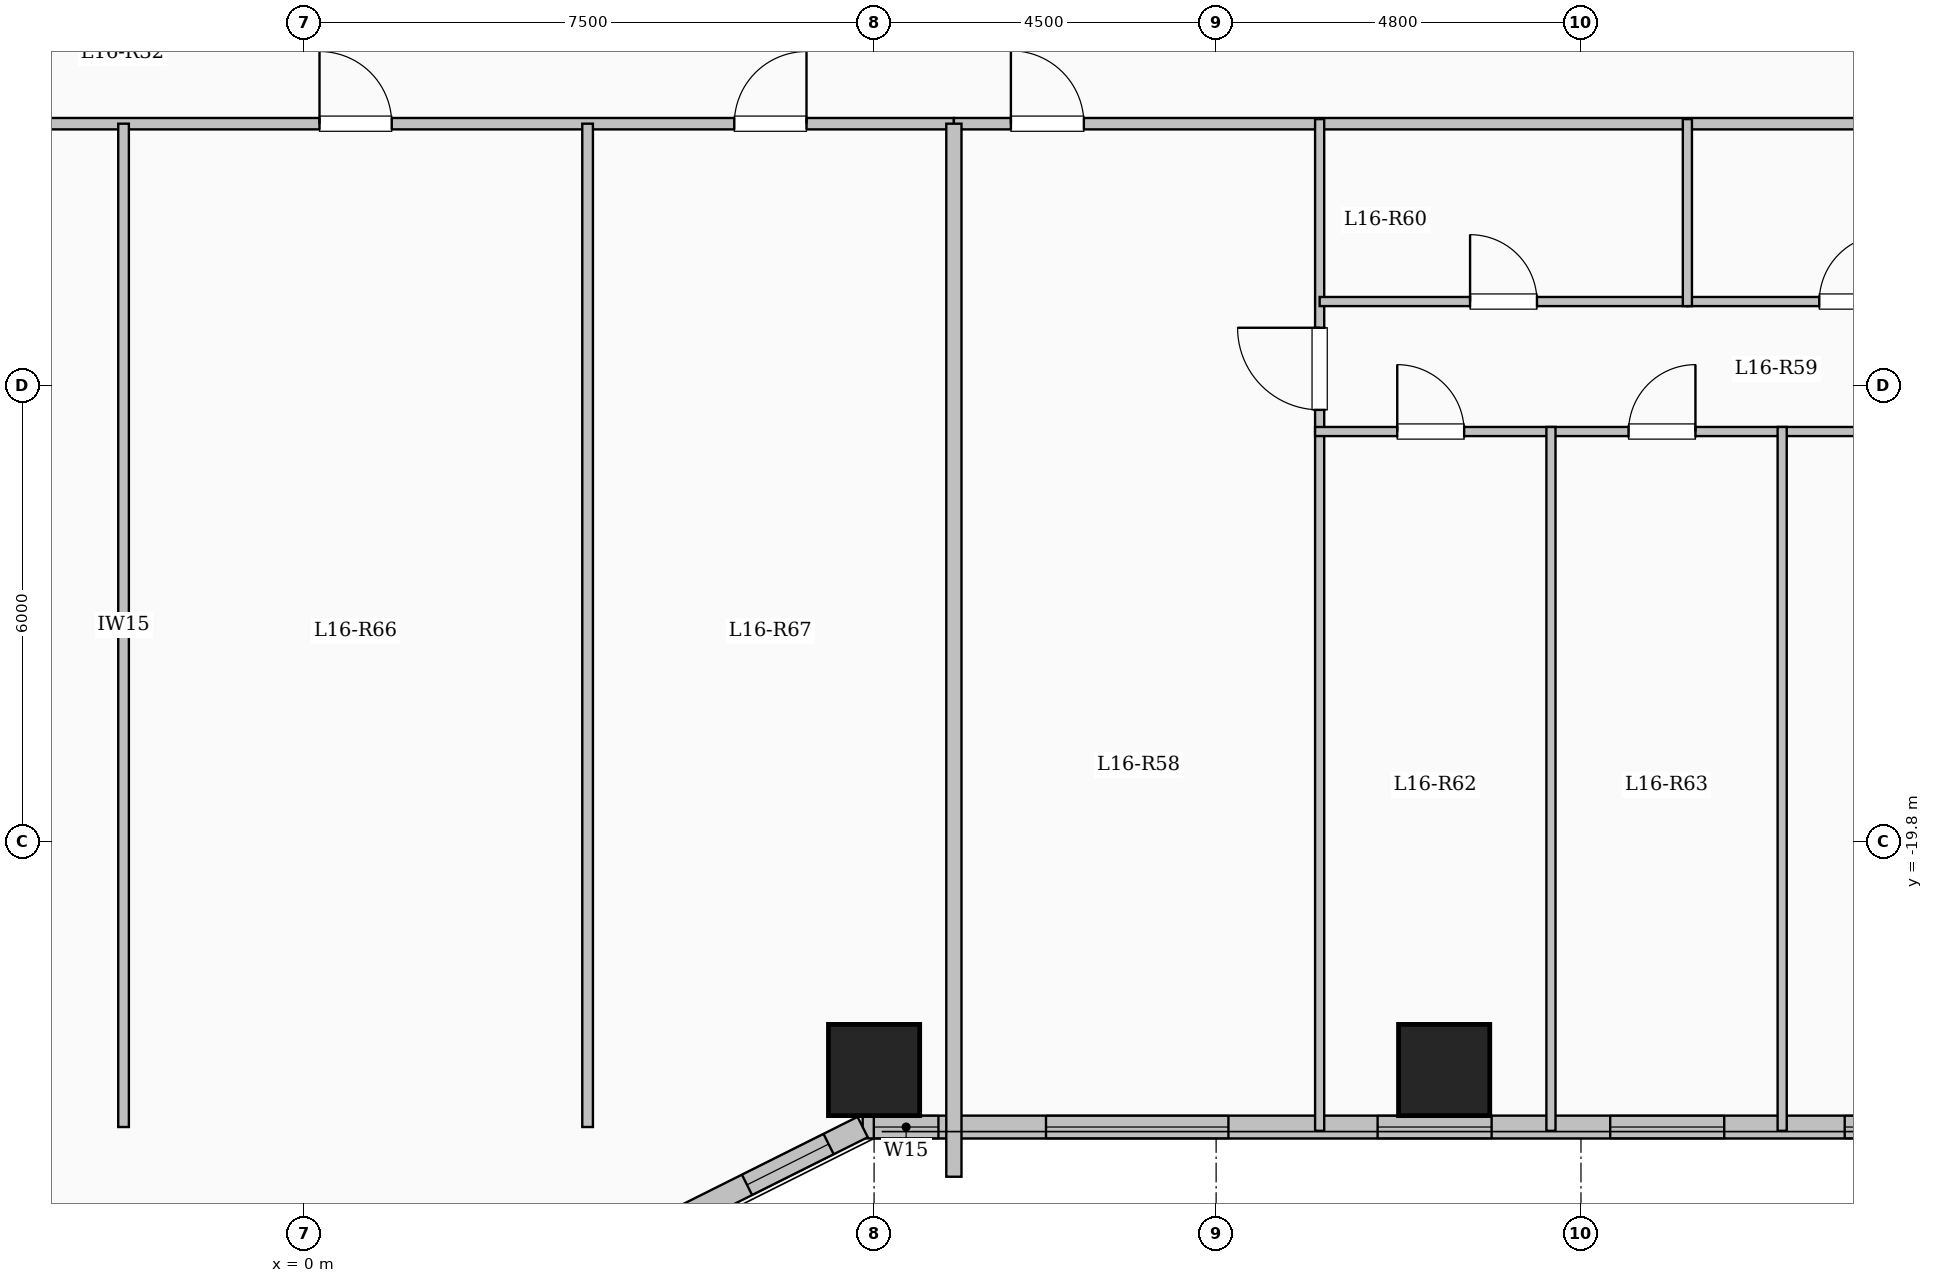
"""IFC4 building model, lengths in metres.
Left out: names, types, materials, properties, quantities, classifications, styles, units other than length and angle.
Written with IfcOpenShell. Run it as: python <this file> out.ifc"""

import sys

from ifc_helpers import new_model, si_unit, direction, frame, frame_2d, origin, origin_2d, place, context, subcontext, project, spatial, rectangle, extrude, element, fill, save


model = new_model("IFC4")
c1 = context("Model", 3, precision=1e-05, world=origin(), true_north=direction((0.0, 1.0)))
c2 = subcontext(c1, "Body", "Model", "MODEL_VIEW")
j1 = project(units=[si_unit("LENGTHUNIT", "METRE"), si_unit("PLANEANGLEUNIT", "RADIAN")], contexts=[c1])
p1 = place(None, origin())
s1 = spatial("IfcSite", under=j1, at=p1, CompositionType="ELEMENT")
p2 = place(p1, origin())
s2 = spatial("IfcBuilding", under=s1, at=p2, CompositionType="ELEMENT")
p3 = place(p2, frame((0.0, 0.0, 60.85)))
s3 = spatial("IfcBuildingStorey", under=s2, at=p3, CompositionType="ELEMENT", Elevation=60.85)
for number, where, z_axis, x_axis in (
    (1, (7.5, -22.8, 0.0), (0.0, 0.0, 1.0), (1.0, 0.0, 0.0)),
    (2, (15.0, -22.8, 0.0), (0.0, 0.0, 1.0), (1.0, 0.0, 0.0)),
):
    element("IfcColumn", number, at=place(p3, frame(where, z_axis=z_axis, x_axis=x_axis)), inside=s3, PredefinedType="COLUMN", context=c2, shape_type="SweptSolid", body=[
        extrude(rectangle(XDim=1.2, YDim=1.2, at=origin_2d()), origin(), (0.0, 0.0, 1.0), 3.35),
    ])
p4 = place(p3, frame((22.65, -23.55, 0.0), z_axis=(0.0, 0.0, 1.0), x_axis=(-1.0, 0.0, 0.0)))
e3 = element("IfcWall", 3, at=p4, inside=s3, PredefinedType="SOLIDWALL", context=c2, shape_type="SweptSolid", body=[
    extrude(rectangle(XDim=15.3, YDim=0.3, at=frame_2d((7.65, 0.0))), origin(), (0.0, 0.0, 1.0), 3.05),
])
p5 = place(p4, frame((0.88, 0.0, 0.9)))
e4 = element("IfcOpeningElement", 4, at=p5, cuts=e3, PredefinedType="OPENING", context=c2, shape_type="SweptSolid", body=[
    extrude(rectangle(XDim=1.5, YDim=1.65, at=frame_2d((0.75, 0.825))), frame((0.0, 0.16, 0.0), z_axis=(0.0, -1.0, 0.0), x_axis=(1.0, 0.0, 0.0)), (0.0, 0.0, 1.0), 0.32),
])
p6 = place(p4, frame((3.965, 0.0, 0.9)))
e5 = element("IfcOpeningElement", 5, at=p6, cuts=e3, PredefinedType="OPENING", context=c2, shape_type="SweptSolid", body=[
    extrude(rectangle(XDim=1.5, YDim=1.65, at=frame_2d((0.75, 0.825))), frame((0.0, 0.16, 0.0), z_axis=(0.0, -1.0, 0.0), x_axis=(1.0, 0.0, 0.0)), (0.0, 0.0, 1.0), 0.32),
])
p7 = place(p4, frame((7.025, 0.0, 0.9)))
e6 = element("IfcOpeningElement", 6, at=p7, cuts=e3, PredefinedType="OPENING", context=c2, shape_type="SweptSolid", body=[
    extrude(rectangle(XDim=1.5, YDim=1.65, at=frame_2d((0.75, 0.825))), frame((0.0, 0.16, 0.0), z_axis=(0.0, -1.0, 0.0), x_axis=(1.0, 0.0, 0.0)), (0.0, 0.0, 1.0), 0.32),
])
p8 = place(p4, frame((10.488, 0.0, 0.9)))
e7 = element("IfcOpeningElement", 7, at=p8, cuts=e3, PredefinedType="OPENING", context=c2, shape_type="SweptSolid", body=[
    extrude(rectangle(XDim=2.4, YDim=1.8, at=frame_2d((1.2, 0.9))), frame((0.0, 0.16, 0.0), z_axis=(0.0, -1.0, 0.0), x_axis=(1.0, 0.0, 0.0)), (0.0, 0.0, 1.0), 0.32),
])
p9 = place(p4, frame((14.303, 0.0, 0.95)))
e8 = element("IfcOpeningElement", 8, at=p9, cuts=e3, PredefinedType="OPENING", context=c2, shape_type="SweptSolid", body=[
    extrude(rectangle(XDim=0.85, YDim=1.5, at=frame_2d((0.425, 0.75))), frame((0.0, 0.16, 0.0), z_axis=(0.0, -1.0, 0.0), x_axis=(1.0, 0.0, 0.0)), (0.0, 0.0, 1.0), 0.32),
])
p10 = place(p3, frame((7.35, -23.55, 0.0), z_axis=(0.0, 0.0, 1.0), x_axis=(-0.894427191, -0.4472135955, 0.0)))
e9 = element("IfcWall", 9, at=p10, inside=s3, PredefinedType="SOLIDWALL", context=c2, shape_type="SweptSolid", body=[
    extrude(rectangle(XDim=3.354, YDim=0.3, at=frame_2d((1.677, 0.0))), origin(), (0.0, 0.0, 1.0), 3.05),
])
p11 = place(p10, frame((0.501, 0.0, 0.95)))
e10 = element("IfcOpeningElement", 10, at=p11, cuts=e9, PredefinedType="OPENING", context=c2, shape_type="SweptSolid", body=[
    extrude(rectangle(XDim=1.2, YDim=1.5, at=frame_2d((0.6, 0.75))), frame((0.0, 0.16, 0.0), z_axis=(0.0, -1.0, 0.0), x_axis=(1.0, 0.0, 0.0)), (0.0, 0.0, 1.0), 0.32),
])
p12 = place(p3, frame((-8.55, -10.35, 0.0), z_axis=(0.0, 0.0, 1.0), x_axis=(1.0, 0.0, 0.0)))
e11 = element("IfcWall", 11, at=p12, inside=s3, PredefinedType="PARTITIONING", context=c2, shape_type="SweptSolid", body=[
    extrude(rectangle(XDim=17.1, YDim=0.15, at=frame_2d((8.55, 0.0))), origin(), (0.0, 0.0, 1.0), 3.05),
])
p13 = place(p12, frame((2.618, 0.0, 0.0)))
e12 = element("IfcOpeningElement", 12, at=p13, cuts=e11, PredefinedType="OPENING", context=c2, shape_type="SweptSolid", body=[
    extrude(rectangle(XDim=0.95, YDim=2.15, at=frame_2d((0.475, 1.075))), frame((0.0, 0.085, 0.0), z_axis=(0.0, -1.0, 0.0), x_axis=(1.0, 0.0, 0.0)), (0.0, 0.0, 1.0), 0.17),
])
p14 = place(p12, frame((8.754, 0.0, 0.0)))
e13 = element("IfcOpeningElement", 13, at=p14, cuts=e11, PredefinedType="OPENING", context=c2, shape_type="SweptSolid", body=[
    extrude(rectangle(XDim=0.95, YDim=2.15, at=frame_2d((0.475, 1.075))), frame((0.0, 0.085, 0.0), z_axis=(0.0, -1.0, 0.0), x_axis=(1.0, 0.0, 0.0)), (0.0, 0.0, 1.0), 0.17),
])
p15 = place(p12, frame((14.211, 0.0, 0.0)))
e14 = element("IfcOpeningElement", 14, at=p15, cuts=e11, PredefinedType="OPENING", context=c2, shape_type="SweptSolid", body=[
    extrude(rectangle(XDim=0.95, YDim=2.15, at=frame_2d((0.475, 1.075))), frame((0.0, 0.085, 0.0), z_axis=(0.0, -1.0, 0.0), x_axis=(1.0, 0.0, 0.0)), (0.0, 0.0, 1.0), 0.17),
])
p16 = place(p3, frame((8.55, -10.35, 0.0), z_axis=(0.0, 0.0, 1.0), x_axis=(1.0, 0.0, 0.0)))
e15 = element("IfcWall", 15, at=p16, inside=s3, PredefinedType="PARTITIONING", context=c2, shape_type="SweptSolid", body=[
    extrude(rectangle(XDim=14.0, YDim=0.15, at=frame_2d((7.0, 0.0))), origin(), (0.0, 0.0, 1.0), 3.05),
])
p17 = place(p16, frame((0.75, 0.0, 0.0)))
e16 = element("IfcOpeningElement", 16, at=p17, cuts=e15, PredefinedType="OPENING", context=c2, shape_type="SweptSolid", body=[
    extrude(rectangle(XDim=0.96, YDim=2.15, at=frame_2d((0.48, 1.075))), frame((0.0, 0.085, 0.0), z_axis=(0.0, -1.0, 0.0), x_axis=(1.0, 0.0, 0.0)), (0.0, 0.0, 1.0), 0.17),
])
p18 = place(p3, frame((13.362, -23.6, 0.0), z_axis=(0.0, 0.0, 1.0), x_axis=(0.0, 1.0, 0.0)))
e17 = element("IfcWall", 17, at=p18, inside=s3, PredefinedType="PARTITIONING", context=c2, shape_type="SweptSolid", body=[
    extrude(rectangle(XDim=13.31, YDim=0.12, at=frame_2d((6.655, 0.0))), origin(), (0.0, 0.0, 1.0), 3.05),
])
p19 = place(p18, frame((9.485, 0.0, 0.0)))
e18 = element("IfcOpeningElement", 18, at=p19, cuts=e17, PredefinedType="OPENING", context=c2, shape_type="SweptSolid", body=[
    extrude(rectangle(XDim=1.08, YDim=2.15, at=frame_2d((0.54, 1.075))), frame((0.0, 0.07, 0.0), z_axis=(0.0, -1.0, 0.0), x_axis=(1.0, 0.0, 0.0)), (0.0, 0.0, 1.0), 0.14),
])
p20 = place(p3, frame((13.362, -12.69, 0.0), z_axis=(0.0, 0.0, 1.0), x_axis=(1.0, 0.0, 0.0)))
e19 = element("IfcWall", 19, at=p20, inside=s3, PredefinedType="PARTITIONING", context=c2, shape_type="SweptSolid", body=[
    extrude(rectangle(XDim=4.838, YDim=0.12, at=frame_2d((2.419, 0.0))), origin(), (0.0, 0.0, 1.0), 2.535),
])
p21 = place(p20, frame((1.979, 0.0, 0.0)))
e20 = element("IfcOpeningElement", 20, at=p21, cuts=e19, PredefinedType="OPENING", context=c2, shape_type="SweptSolid", body=[
    extrude(rectangle(XDim=0.88, YDim=2.1, at=frame_2d((0.44, 1.05))), frame((0.0, 0.07, 0.0), z_axis=(0.0, -1.0, 0.0), x_axis=(1.0, 0.0, 0.0)), (0.0, 0.0, 1.0), 0.14),
])
p22 = place(p3, frame((18.2, -12.69, 0.0), z_axis=(0.0, 0.0, 1.0), x_axis=(1.0, 0.0, 0.0)))
e21 = element("IfcWall", 21, at=p22, inside=s3, PredefinedType="PARTITIONING", context=c2, shape_type="SweptSolid", body=[
    extrude(rectangle(XDim=4.35, YDim=0.12, at=frame_2d((2.175, 0.0))), origin(), (0.0, 0.0, 1.0), 3.05),
])
p23 = place(p22, frame((1.735, 0.0, 0.0)))
e22 = element("IfcOpeningElement", 22, at=p23, cuts=e21, PredefinedType="OPENING", context=c2, shape_type="SweptSolid", body=[
    extrude(rectangle(XDim=0.88, YDim=2.1, at=frame_2d((0.44, 1.05))), frame((0.0, 0.07, 0.0), z_axis=(0.0, -1.0, 0.0), x_axis=(1.0, 0.0, 0.0)), (0.0, 0.0, 1.0), 0.14),
])
p24 = place(p3, frame((13.302, -14.4, 0.0), z_axis=(0.0, 0.0, 1.0), x_axis=(1.0, 0.0, 0.0)))
e23 = element("IfcWall", 23, at=p24, inside=s3, PredefinedType="PARTITIONING", context=c2, shape_type="SweptSolid", body=[
    extrude(rectangle(XDim=9.308, YDim=0.12, at=frame_2d((4.654, 0.0))), origin(), (0.0, 0.0, 1.0), 3.05),
])
p25 = place(p24, frame((1.081, 0.0, 0.0)))
e24 = element("IfcOpeningElement", 24, at=p25, cuts=e23, PredefinedType="OPENING", context=c2, shape_type="SweptSolid", body=[
    extrude(rectangle(XDim=0.88, YDim=2.1, at=frame_2d((0.44, 1.05))), frame((0.0, 0.07, 0.0), z_axis=(0.0, -1.0, 0.0), x_axis=(1.0, 0.0, 0.0)), (0.0, 0.0, 1.0), 0.14),
])
p26 = place(p24, frame((4.124, 0.0, 0.0)))
e25 = element("IfcOpeningElement", 25, at=p26, cuts=e23, PredefinedType="OPENING", context=c2, shape_type="SweptSolid", body=[
    extrude(rectangle(XDim=0.88, YDim=2.1, at=frame_2d((0.44, 1.05))), frame((0.0, 0.07, 0.0), z_axis=(0.0, -1.0, 0.0), x_axis=(1.0, 0.0, 0.0)), (0.0, 0.0, 1.0), 0.14),
])
p27 = place(p24, frame((7.167, 0.0, 0.0)))
e26 = element("IfcOpeningElement", 26, at=p27, cuts=e23, PredefinedType="OPENING", context=c2, shape_type="SweptSolid", body=[
    extrude(rectangle(XDim=0.88, YDim=2.1, at=frame_2d((0.44, 1.05))), frame((0.0, 0.07, 0.0), z_axis=(0.0, -1.0, 0.0), x_axis=(1.0, 0.0, 0.0)), (0.0, 0.0, 1.0), 0.14),
])
p28 = place(p3, frame((18.2, -12.75, 0.0), z_axis=(0.0, 0.0, 1.0), x_axis=(0.0, 1.0, 0.0)))
e27 = element("IfcWall", 27, at=p28, inside=s3, PredefinedType="PARTITIONING", context=c2, shape_type="SweptSolid", body=[
    extrude(rectangle(XDim=2.46, YDim=0.12, at=frame_2d((1.23, 0.0))), origin(), (0.0, 0.0, 1.0), 3.05),
])
for number, where, z_axis, x_axis in (
    (28, (16.405, -23.6, 0.0), (0.0, 0.0, 1.0), (0.0, 1.0, 0.0)),
    (29, (19.447, -23.6, 0.0), (0.0, 0.0, 1.0), (0.0, 1.0, 0.0)),
):
    element("IfcWall", number, at=place(p3, frame(where, z_axis=z_axis, x_axis=x_axis)), inside=s3, PredefinedType="PARTITIONING", context=c2, shape_type="SweptSolid", body=[
        extrude(rectangle(XDim=9.26, YDim=0.12, at=frame_2d((4.63, 0.0))), origin(), (0.0, 0.0, 1.0), 3.05),
    ])
p29 = place(p3, frame((8.55, -24.204, 0.0), z_axis=(0.0, 0.0, 1.0), x_axis=(0.0, 1.0, 0.0)))
e30 = element("IfcWall", 30, at=p29, inside=s3, PredefinedType="SOLIDWALL", context=c2, shape_type="SweptSolid", body=[
    extrude(rectangle(XDim=13.854, YDim=0.2, at=frame_2d((6.927, 0.0))), origin(), (0.0, 0.0, 1.0), 3.05),
])
for number, where, z_axis, x_axis in (
    (31, (-2.374, -23.55, 0.0), (0.0, 0.0, 1.0), (0.0, 1.0, 0.0)),
    (32, (3.731, -23.55, 0.0), (0.0, 0.0, 1.0), (0.0, 1.0, 0.0)),
):
    element("IfcWall", number, at=place(p3, frame(where, z_axis=z_axis, x_axis=x_axis)), inside=s3, PredefinedType="PARTITIONING", context=c2, shape_type="SweptSolid", body=[
        extrude(rectangle(XDim=13.2, YDim=0.14, at=frame_2d((6.6, 0.0))), origin(), (0.0, 0.0, 1.0), 3.05),
    ])
p30 = place(p5, origin())
e33 = element("IfcWindow", 33, at=p30, inside=s3, PartitioningType="SINGLE_PANEL", PredefinedType="WINDOW", context=c2, shape_type="SweptSolid", body=[
    extrude(rectangle(XDim=1.5, YDim=1.65, at=frame_2d((0.75, 0.825))), frame((0.0, 0.03, 0.0), z_axis=(0.0, -1.0, 0.0), x_axis=(1.0, 0.0, 0.0)), (0.0, 0.0, 1.0), 0.06),
])
fill(e4, e33)
p31 = place(p6, origin())
e34 = element("IfcWindow", 34, at=p31, inside=s3, PartitioningType="SINGLE_PANEL", PredefinedType="WINDOW", context=c2, shape_type="SweptSolid", body=[
    extrude(rectangle(XDim=1.5, YDim=1.65, at=frame_2d((0.75, 0.825))), frame((0.0, 0.03, 0.0), z_axis=(0.0, -1.0, 0.0), x_axis=(1.0, 0.0, 0.0)), (0.0, 0.0, 1.0), 0.06),
])
fill(e5, e34)
p32 = place(p7, origin())
e35 = element("IfcWindow", 35, at=p32, inside=s3, PartitioningType="SINGLE_PANEL", PredefinedType="WINDOW", context=c2, shape_type="SweptSolid", body=[
    extrude(rectangle(XDim=1.5, YDim=1.65, at=frame_2d((0.75, 0.825))), frame((0.0, 0.03, 0.0), z_axis=(0.0, -1.0, 0.0), x_axis=(1.0, 0.0, 0.0)), (0.0, 0.0, 1.0), 0.06),
])
fill(e6, e35)
p33 = place(p8, origin())
e36 = element("IfcWindow", 36, at=p33, inside=s3, PartitioningType="SINGLE_PANEL", PredefinedType="WINDOW", context=c2, shape_type="SweptSolid", body=[
    extrude(rectangle(XDim=2.4, YDim=1.8, at=frame_2d((1.2, 0.9))), frame((0.0, 0.03, 0.0), z_axis=(0.0, -1.0, 0.0), x_axis=(1.0, 0.0, 0.0)), (0.0, 0.0, 1.0), 0.06),
])
fill(e7, e36)
p34 = place(p9, origin())
e37 = element("IfcWindow", 37, at=p34, inside=s3, PartitioningType="SINGLE_PANEL", PredefinedType="WINDOW", context=c2, shape_type="SweptSolid", body=[
    extrude(rectangle(XDim=0.85, YDim=1.5, at=frame_2d((0.425, 0.75))), frame((0.0, 0.03, 0.0), z_axis=(0.0, -1.0, 0.0), x_axis=(1.0, 0.0, 0.0)), (0.0, 0.0, 1.0), 0.06),
])
fill(e8, e37)
p35 = place(p11, origin())
e38 = element("IfcWindow", 38, at=p35, inside=s3, PartitioningType="SINGLE_PANEL", PredefinedType="WINDOW", context=c2, shape_type="SweptSolid", body=[
    extrude(rectangle(XDim=1.2, YDim=1.5, at=frame_2d((0.6, 0.75))), frame((0.0, 0.03, 0.0), z_axis=(0.0, -1.0, 0.0), x_axis=(1.0, 0.0, 0.0)), (0.0, 0.0, 1.0), 0.06),
])
fill(e10, e38)
p36 = place(p17, origin())
e39 = element("IfcDoor", 39, at=p36, inside=s3, OperationType="SINGLE_SWING_LEFT", PredefinedType="DOOR", context=c2, shape_type="SweptSolid", body=[
    extrude(rectangle(XDim=0.96, YDim=2.15, at=frame_2d((0.48, 1.075))), frame((0.0, 0.025, 0.0), z_axis=(0.0, -1.0, 0.0), x_axis=(1.0, 0.0, 0.0)), (0.0, 0.0, 1.0), 0.05),
])
fill(e16, e39)
p37 = place(p19, origin())
e40 = element("IfcDoor", 40, at=p37, inside=s3, OperationType="SINGLE_SWING_RIGHT", PredefinedType="DOOR", context=c2, shape_type="SweptSolid", body=[
    extrude(rectangle(XDim=1.08, YDim=2.15, at=frame_2d((0.54, 1.075))), frame((0.0, 0.025, 0.0), z_axis=(0.0, -1.0, 0.0), x_axis=(1.0, 0.0, 0.0)), (0.0, 0.0, 1.0), 0.05),
])
fill(e18, e40)
p38 = place(p21, origin())
e41 = element("IfcDoor", 41, at=p38, inside=s3, OperationType="SINGLE_SWING_LEFT", PredefinedType="DOOR", context=c2, shape_type="SweptSolid", body=[
    extrude(rectangle(XDim=0.88, YDim=2.1, at=frame_2d((0.44, 1.05))), frame((0.0, 0.025, 0.0), z_axis=(0.0, -1.0, 0.0), x_axis=(1.0, 0.0, 0.0)), (0.0, 0.0, 1.0), 0.05),
])
fill(e20, e41)
p39 = place(p23, origin())
e42 = element("IfcDoor", 42, at=p39, inside=s3, OperationType="SINGLE_SWING_RIGHT", PredefinedType="DOOR", context=c2, shape_type="SweptSolid", body=[
    extrude(rectangle(XDim=0.88, YDim=2.1, at=frame_2d((0.44, 1.05))), frame((0.0, 0.025, 0.0), z_axis=(0.0, -1.0, 0.0), x_axis=(1.0, 0.0, 0.0)), (0.0, 0.0, 1.0), 0.05),
])
fill(e22, e42)
p40 = place(p25, origin())
e43 = element("IfcDoor", 43, at=p40, inside=s3, OperationType="SINGLE_SWING_LEFT", PredefinedType="DOOR", context=c2, shape_type="SweptSolid", body=[
    extrude(rectangle(XDim=0.88, YDim=2.1, at=frame_2d((0.44, 1.05))), frame((0.0, 0.025, 0.0), z_axis=(0.0, -1.0, 0.0), x_axis=(1.0, 0.0, 0.0)), (0.0, 0.0, 1.0), 0.05),
])
fill(e24, e43)
p41 = place(p26, origin())
e44 = element("IfcDoor", 44, at=p41, inside=s3, OperationType="SINGLE_SWING_RIGHT", PredefinedType="DOOR", context=c2, shape_type="SweptSolid", body=[
    extrude(rectangle(XDim=0.88, YDim=2.1, at=frame_2d((0.44, 1.05))), frame((0.0, 0.025, 0.0), z_axis=(0.0, -1.0, 0.0), x_axis=(1.0, 0.0, 0.0)), (0.0, 0.0, 1.0), 0.05),
])
fill(e25, e44)
p42 = place(p14, origin())
e45 = element("IfcDoor", 45, at=p42, inside=s3, OperationType="SINGLE_SWING_LEFT", PredefinedType="DOOR", context=c2, shape_type="SweptSolid", body=[
    extrude(rectangle(XDim=0.95, YDim=2.15, at=frame_2d((0.475, 1.075))), frame((0.0, 0.025, 0.0), z_axis=(0.0, -1.0, 0.0), x_axis=(1.0, 0.0, 0.0)), (0.0, 0.0, 1.0), 0.05),
])
fill(e13, e45)
p43 = place(p15, origin())
e46 = element("IfcDoor", 46, at=p43, inside=s3, OperationType="SINGLE_SWING_RIGHT", PredefinedType="DOOR", context=c2, shape_type="SweptSolid", body=[
    extrude(rectangle(XDim=0.95, YDim=2.15, at=frame_2d((0.475, 1.075))), frame((0.0, 0.025, 0.0), z_axis=(0.0, -1.0, 0.0), x_axis=(1.0, 0.0, 0.0)), (0.0, 0.0, 1.0), 0.05),
])
fill(e14, e46)
save(model, sys.argv[1])
